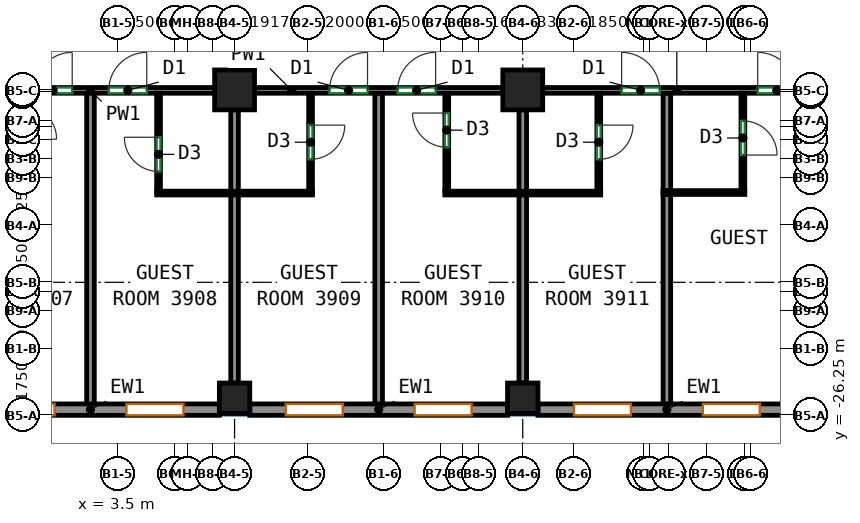
"""IFC4 building model, lengths in metres.
Left out: names, types, materials, properties, quantities, classifications, styles, units other than length and angle.
Written with IfcOpenShell. Run it as: python <this file> out.ifc"""

import sys

from ifc_helpers import new_model, si_unit, direction, frame, frame_2d, origin, origin_2d, place, context, subcontext, project, spatial, rectangle, extrude, source, transform, mapped, element, fill, save


model = new_model("IFC4")
c1 = context("Model", 3, precision=1e-05, world=origin(), true_north=direction((0.0, 1.0)))
c2 = subcontext(c1, "Body", "Model", "MODEL_VIEW")
j1 = project(units=[si_unit("LENGTHUNIT", "METRE"), si_unit("PLANEANGLEUNIT", "RADIAN")], contexts=[c1])
p1 = place(None, origin())
s1 = spatial("IfcSite", under=j1, at=p1, CompositionType="ELEMENT")
p2 = place(p1, origin())
s2 = spatial("IfcBuilding", under=s1, at=p2, CompositionType="ELEMENT")
p3 = place(p2, frame((0.0, 0.0, 168.5)))
s3 = spatial("IfcBuildingStorey", under=s2, at=p3, CompositionType="ELEMENT", Elevation=168.5)
m1 = source(origin(), c2, "Body", "SweptSolid", [
    extrude(rectangle(XDim=0.8, YDim=0.8, at=origin_2d()), origin(), (0.0, 0.0, 1.0), 3.12),
])
p4 = place(p3, frame((6.583, -25.8, 0.0), z_axis=(0.0, 0.0, 1.0), x_axis=(1.0, 0.0, 0.0)))
e1 = element("IfcColumn", 1, at=p4, inside=s3, PredefinedType="COLUMN", context=c2, shape_type="MappedRepresentation", body=[
    mapped(m1, transform((0.0, 0.0, 0.0))),
])
m2 = source(origin(), c2, "Body", "SweptSolid", [
    extrude(rectangle(XDim=1.05, YDim=1.05, at=origin_2d()), origin(), (0.0, 0.0, 1.0), 3.12),
])
p5 = place(p3, frame((6.583, -17.688, 0.0), z_axis=(0.0, 0.0, 1.0), x_axis=(1.0, 0.0, 0.0)))
e2 = element("IfcColumn", 2, at=p5, inside=s3, PredefinedType="COLUMN", context=c2, shape_type="MappedRepresentation", body=[
    mapped(m2, transform((0.0, 0.0, 0.0))),
])
p6 = place(p3, frame((14.167, -25.8, 0.0), z_axis=(0.0, 0.0, 1.0), x_axis=(1.0, 0.0, 0.0)))
e3 = element("IfcColumn", 3, at=p6, inside=s3, PredefinedType="COLUMN", context=c2, shape_type="MappedRepresentation", body=[
    mapped(m1, transform((0.0, 0.0, 0.0))),
])
p7 = place(p3, frame((14.167, -17.688, 0.0), z_axis=(0.0, 0.0, 1.0), x_axis=(1.0, 0.0, 0.0)))
e4 = element("IfcColumn", 4, at=p7, inside=s3, PredefinedType="COLUMN", context=c2, shape_type="MappedRepresentation", body=[
    mapped(m2, transform((0.0, 0.0, 0.0))),
])
m3 = source(origin(), c2, "Body", "SweptSolid", [
    extrude(rectangle(XDim=6.783, YDim=0.3, at=frame_2d((3.392, 0.0))), origin(), (0.0, 0.0, 1.0), 3.12),
])
p8 = place(p3, frame((-0.6, -26.1, 0.0), z_axis=(0.0, 0.0, 1.0), x_axis=(1.0, 0.0, 0.0)))
e5 = element("IfcWall", 5, at=p8, inside=s3, PredefinedType="SOLIDWALL", context=c2, shape_type="MappedRepresentation", body=[
    mapped(m3, transform((0.0, 0.0, 0.0))),
])
p9 = place(p8, frame((0.946, 0.0, 0.85)))
e6 = element("IfcOpeningElement", 6, at=p9, cuts=e5, PredefinedType="OPENING", context=c2, shape_type="SweptSolid", body=[
    extrude(rectangle(XDim=1.5, YDim=1.95, at=frame_2d((0.75, 0.975))), frame((0.0, 0.16, 0.0), z_axis=(0.0, -1.0, 0.0), x_axis=(1.0, 0.0, 0.0)), (0.0, 0.0, 1.0), 0.32),
])
p10 = place(p8, frame((4.337, 0.0, 0.85)))
e7 = element("IfcOpeningElement", 7, at=p10, cuts=e5, PredefinedType="OPENING", context=c2, shape_type="SweptSolid", body=[
    extrude(rectangle(XDim=1.5, YDim=1.95, at=frame_2d((0.75, 0.975))), frame((0.0, 0.16, 0.0), z_axis=(0.0, -1.0, 0.0), x_axis=(1.0, 0.0, 0.0)), (0.0, 0.0, 1.0), 0.32),
])
m4 = source(origin(), c2, "Body", "SweptSolid", [
    extrude(rectangle(XDim=6.783, YDim=0.3, at=frame_2d((3.392, 0.0))), origin(), (0.0, 0.0, 1.0), 3.12),
])
p11 = place(p3, frame((6.983, -26.1, 0.0), z_axis=(0.0, 0.0, 1.0), x_axis=(1.0, 0.0, 0.0)))
e8 = element("IfcWall", 8, at=p11, inside=s3, PredefinedType="SOLIDWALL", context=c2, shape_type="MappedRepresentation", body=[
    mapped(m4, transform((0.0, 0.0, 0.0))),
])
p12 = place(p11, frame((0.946, 0.0, 0.85)))
e9 = element("IfcOpeningElement", 9, at=p12, cuts=e8, PredefinedType="OPENING", context=c2, shape_type="SweptSolid", body=[
    extrude(rectangle(XDim=1.5, YDim=1.95, at=frame_2d((0.75, 0.975))), frame((0.0, 0.16, 0.0), z_axis=(0.0, -1.0, 0.0), x_axis=(1.0, 0.0, 0.0)), (0.0, 0.0, 1.0), 0.32),
])
p13 = place(p11, frame((4.338, 0.0, 0.85)))
e10 = element("IfcOpeningElement", 10, at=p13, cuts=e8, PredefinedType="OPENING", context=c2, shape_type="SweptSolid", body=[
    extrude(rectangle(XDim=1.5, YDim=1.95, at=frame_2d((0.75, 0.975))), frame((0.0, 0.16, 0.0), z_axis=(0.0, -1.0, 0.0), x_axis=(1.0, 0.0, 0.0)), (0.0, 0.0, 1.0), 0.32),
])
p14 = place(p3, frame((14.567, -26.1, 0.0), z_axis=(0.0, 0.0, 1.0), x_axis=(1.0, 0.0, 0.0)))
e11 = element("IfcWall", 11, at=p14, inside=s3, PredefinedType="SOLIDWALL", context=c2, shape_type="MappedRepresentation", body=[
    mapped(m3, transform((0.0, 0.0, 0.0))),
])
p15 = place(p14, frame((0.946, 0.0, 0.85)))
e12 = element("IfcOpeningElement", 12, at=p15, cuts=e11, PredefinedType="OPENING", context=c2, shape_type="SweptSolid", body=[
    extrude(rectangle(XDim=1.5, YDim=1.95, at=frame_2d((0.75, 0.975))), frame((0.0, 0.16, 0.0), z_axis=(0.0, -1.0, 0.0), x_axis=(1.0, 0.0, 0.0)), (0.0, 0.0, 1.0), 0.32),
])
p16 = place(p14, frame((4.337, 0.0, 0.85)))
e13 = element("IfcOpeningElement", 13, at=p16, cuts=e11, PredefinedType="OPENING", context=c2, shape_type="SweptSolid", body=[
    extrude(rectangle(XDim=1.5, YDim=1.95, at=frame_2d((0.75, 0.975))), frame((0.0, 0.16, 0.0), z_axis=(0.0, -1.0, 0.0), x_axis=(1.0, 0.0, 0.0)), (0.0, 0.0, 1.0), 0.32),
])
p17 = place(p3, frame((-0.475, -17.7, 0.0), z_axis=(0.0, 0.0, 1.0), x_axis=(1.0, 0.0, 0.0)))
e14 = element("IfcWall", 14, at=p17, inside=s3, PredefinedType="PARTITIONING", context=c2, shape_type="SweptSolid", body=[
    extrude(rectangle(XDim=6.533, YDim=0.15, at=frame_2d((3.267, 0.0))), origin(), (0.0, 0.0, 1.0), 3.12),
])
p18 = place(p17, frame((1.786, 0.0, 0.0)))
e15 = element("IfcOpeningElement", 15, at=p18, cuts=e14, PredefinedType="OPENING", context=c2, shape_type="SweptSolid", body=[
    extrude(rectangle(XDim=1.0, YDim=2.1, at=frame_2d((0.5, 1.05))), frame((0.0, 0.085, 0.0), z_axis=(0.0, -1.0, 0.0), x_axis=(1.0, 0.0, 0.0)), (0.0, 0.0, 1.0), 0.17),
])
p19 = place(p17, frame((3.748, 0.0, 0.0)))
e16 = element("IfcOpeningElement", 16, at=p19, cuts=e14, PredefinedType="OPENING", context=c2, shape_type="SweptSolid", body=[
    extrude(rectangle(XDim=1.0, YDim=2.1, at=frame_2d((0.5, 1.05))), frame((0.0, 0.085, 0.0), z_axis=(0.0, -1.0, 0.0), x_axis=(1.0, 0.0, 0.0)), (0.0, 0.0, 1.0), 0.17),
])
p20 = place(p3, frame((7.108, -17.7, 0.0), z_axis=(0.0, 0.0, 1.0), x_axis=(1.0, 0.0, 0.0)))
e17 = element("IfcWall", 17, at=p20, inside=s3, PredefinedType="PARTITIONING", context=c2, shape_type="SweptSolid", body=[
    extrude(rectangle(XDim=6.534, YDim=0.15, at=frame_2d((3.267, 0.0))), origin(), (0.0, 0.0, 1.0), 3.12),
])
p21 = place(p20, frame((1.974, 0.0, 0.0)))
e18 = element("IfcOpeningElement", 18, at=p21, cuts=e17, PredefinedType="OPENING", context=c2, shape_type="SweptSolid", body=[
    extrude(rectangle(XDim=1.0, YDim=2.1, at=frame_2d((0.5, 1.05))), frame((0.0, 0.085, 0.0), z_axis=(0.0, -1.0, 0.0), x_axis=(1.0, 0.0, 0.0)), (0.0, 0.0, 1.0), 0.17),
])
p22 = place(p20, frame((3.766, 0.0, 0.0)))
e19 = element("IfcOpeningElement", 19, at=p22, cuts=e17, PredefinedType="OPENING", context=c2, shape_type="SweptSolid", body=[
    extrude(rectangle(XDim=1.0, YDim=2.1, at=frame_2d((0.5, 1.05))), frame((0.0, 0.085, 0.0), z_axis=(0.0, -1.0, 0.0), x_axis=(1.0, 0.0, 0.0)), (0.0, 0.0, 1.0), 0.17),
])
p23 = place(p3, frame((14.692, -17.7, 0.0), z_axis=(0.0, 0.0, 1.0), x_axis=(1.0, 0.0, 0.0)))
e20 = element("IfcWall", 20, at=p23, inside=s3, PredefinedType="PARTITIONING", context=c2, shape_type="SweptSolid", body=[
    extrude(rectangle(XDim=7.058, YDim=0.15, at=frame_2d((3.529, 0.0))), origin(), (0.0, 0.0, 1.0), 2.52),
])
p24 = place(p23, frame((2.077, 0.0, 0.0)))
e21 = element("IfcOpeningElement", 21, at=p24, cuts=e20, PredefinedType="OPENING", context=c2, shape_type="SweptSolid", body=[
    extrude(rectangle(XDim=1.0, YDim=2.1, at=frame_2d((0.5, 1.05))), frame((0.0, 0.085, 0.0), z_axis=(0.0, -1.0, 0.0), x_axis=(1.0, 0.0, 0.0)), (0.0, 0.0, 1.0), 0.17),
])
p25 = place(p23, frame((5.657, 0.0, 0.0)))
e22 = element("IfcOpeningElement", 22, at=p25, cuts=e20, PredefinedType="OPENING", context=c2, shape_type="SweptSolid", body=[
    extrude(rectangle(XDim=1.0, YDim=2.1, at=frame_2d((0.5, 1.05))), frame((0.0, 0.085, 0.0), z_axis=(0.0, -1.0, 0.0), x_axis=(1.0, 0.0, 0.0)), (0.0, 0.0, 1.0), 0.17),
])
p26 = place(p3, frame((2.792, -26.0, 0.0), z_axis=(0.0, 0.0, 1.0), x_axis=(0.0, 1.0, 0.0)))
e23 = element("IfcWall", 23, at=p26, inside=s3, PredefinedType="PARTITIONING", context=c2, shape_type="SweptSolid", body=[
    extrude(rectangle(XDim=8.223, YDim=0.2, at=frame_2d((4.111, 0.0))), origin(), (0.0, 0.0, 1.0), 3.12),
])
p27 = place(p3, frame((4.583, -20.352, 0.0), z_axis=(0.0, 0.0, 1.0), x_axis=(0.0, 1.0, 0.0)))
e24 = element("IfcWall", 24, at=p27, inside=s3, PredefinedType="PARTITIONING", context=c2, shape_type="SweptSolid", body=[
    extrude(rectangle(XDim=2.575, YDim=0.1, at=frame_2d((1.288, 0.0))), origin(), (0.0, 0.0, 1.0), 3.12),
])
p28 = place(p27, frame((0.519, 0.0, 0.0)))
e25 = element("IfcOpeningElement", 25, at=p28, cuts=e24, PredefinedType="OPENING", context=c2, shape_type="SweptSolid", body=[
    extrude(rectangle(XDim=0.9, YDim=2.1, at=frame_2d((0.45, 1.05))), frame((0.0, 0.06, 0.0), z_axis=(0.0, -1.0, 0.0), x_axis=(1.0, 0.0, 0.0)), (0.0, 0.0, 1.0), 0.12),
])
p29 = place(p3, frame((4.533, -20.402, 0.0), z_axis=(0.0, 0.0, 1.0), x_axis=(1.0, 0.0, 0.0)))
e26 = element("IfcWall", 26, at=p29, inside=s3, PredefinedType="PARTITIONING", context=c2, shape_type="SweptSolid", body=[
    extrude(rectangle(XDim=4.1, YDim=0.1, at=frame_2d((2.05, 0.0))), origin(), (0.0, 0.0, 1.0), 3.12),
])
p30 = place(p3, frame((6.583, -25.4, 0.0), z_axis=(0.0, 0.0, 1.0), x_axis=(0.0, 1.0, 0.0)))
e27 = element("IfcWall", 27, at=p30, inside=s3, PredefinedType="PARTITIONING", context=c2, shape_type="SweptSolid", body=[
    extrude(rectangle(XDim=4.948, YDim=0.2, at=frame_2d((2.474, 0.0))), origin(), (0.0, 0.0, 1.0), 3.12),
])
p31 = place(p3, frame((6.583, -20.352, 0.0), z_axis=(0.0, 0.0, 1.0), x_axis=(0.0, 1.0, 0.0)))
e28 = element("IfcWall", 28, at=p31, inside=s3, PredefinedType="PARTITIONING", context=c2, shape_type="SweptSolid", body=[
    extrude(rectangle(XDim=2.14, YDim=0.2, at=frame_2d((1.07, 0.0))), origin(), (0.0, 0.0, 1.0), 3.12),
])
p32 = place(p3, frame((8.583, -17.777, 0.0), z_axis=(0.0, 0.0, 1.0), x_axis=(0.0, -1.0, 0.0)))
e29 = element("IfcWall", 29, at=p32, inside=s3, PredefinedType="PARTITIONING", context=c2, shape_type="SweptSolid", body=[
    extrude(rectangle(XDim=2.575, YDim=0.1, at=frame_2d((1.288, 0.0))), origin(), (0.0, 0.0, 1.0), 3.12),
])
p33 = place(p32, frame((0.837, 0.0, 0.0)))
e30 = element("IfcOpeningElement", 30, at=p33, cuts=e29, PredefinedType="OPENING", context=c2, shape_type="SweptSolid", body=[
    extrude(rectangle(XDim=0.9, YDim=2.1, at=frame_2d((0.45, 1.05))), frame((0.0, 0.06, 0.0), z_axis=(0.0, -1.0, 0.0), x_axis=(1.0, 0.0, 0.0)), (0.0, 0.0, 1.0), 0.12),
])
p34 = place(p3, frame((10.375, -26.0, 0.0), z_axis=(0.0, 0.0, 1.0), x_axis=(0.0, 1.0, 0.0)))
e31 = element("IfcWall", 31, at=p34, inside=s3, PredefinedType="PARTITIONING", context=c2, shape_type="SweptSolid", body=[
    extrude(rectangle(XDim=8.223, YDim=0.2, at=frame_2d((4.111, 0.0))), origin(), (0.0, 0.0, 1.0), 3.12),
])
p35 = place(p3, frame((12.167, -20.352, 0.0), z_axis=(0.0, 0.0, 1.0), x_axis=(0.0, 1.0, 0.0)))
e32 = element("IfcWall", 32, at=p35, inside=s3, PredefinedType="PARTITIONING", context=c2, shape_type="SweptSolid", body=[
    extrude(rectangle(XDim=2.575, YDim=0.1, at=frame_2d((1.288, 0.0))), origin(), (0.0, 0.0, 1.0), 3.12),
])
p36 = place(p35, frame((1.156, 0.0, 0.0)))
e33 = element("IfcOpeningElement", 33, at=p36, cuts=e32, PredefinedType="OPENING", context=c2, shape_type="SweptSolid", body=[
    extrude(rectangle(XDim=0.9, YDim=2.1, at=frame_2d((0.45, 1.05))), frame((0.0, 0.06, 0.0), z_axis=(0.0, -1.0, 0.0), x_axis=(1.0, 0.0, 0.0)), (0.0, 0.0, 1.0), 0.12),
])
p37 = place(p3, frame((12.117, -20.402, 0.0), z_axis=(0.0, 0.0, 1.0), x_axis=(1.0, 0.0, 0.0)))
e34 = element("IfcWall", 34, at=p37, inside=s3, PredefinedType="PARTITIONING", context=c2, shape_type="SweptSolid", body=[
    extrude(rectangle(XDim=4.1, YDim=0.1, at=frame_2d((2.05, 0.0))), origin(), (0.0, 0.0, 1.0), 3.12),
])
p38 = place(p3, frame((14.167, -25.4, 0.0), z_axis=(0.0, 0.0, 1.0), x_axis=(0.0, 1.0, 0.0)))
e35 = element("IfcWall", 35, at=p38, inside=s3, PredefinedType="PARTITIONING", context=c2, shape_type="SweptSolid", body=[
    extrude(rectangle(XDim=4.948, YDim=0.2, at=frame_2d((2.474, 0.0))), origin(), (0.0, 0.0, 1.0), 3.12),
])
p39 = place(p3, frame((14.167, -20.352, 0.0), z_axis=(0.0, 0.0, 1.0), x_axis=(0.0, 1.0, 0.0)))
e36 = element("IfcWall", 36, at=p39, inside=s3, PredefinedType="PARTITIONING", context=c2, shape_type="SweptSolid", body=[
    extrude(rectangle(XDim=2.14, YDim=0.2, at=frame_2d((1.07, 0.0))), origin(), (0.0, 0.0, 1.0), 3.12),
])
p40 = place(p3, frame((16.167, -17.777, 0.0), z_axis=(0.0, 0.0, 1.0), x_axis=(0.0, -1.0, 0.0)))
e37 = element("IfcWall", 37, at=p40, inside=s3, PredefinedType="PARTITIONING", context=c2, shape_type="SweptSolid", body=[
    extrude(rectangle(XDim=2.575, YDim=0.1, at=frame_2d((1.288, 0.0))), origin(), (0.0, 0.0, 1.0), 3.12),
])
p41 = place(p40, frame((0.837, 0.0, 0.0)))
e38 = element("IfcOpeningElement", 38, at=p41, cuts=e37, PredefinedType="OPENING", context=c2, shape_type="SweptSolid", body=[
    extrude(rectangle(XDim=0.9, YDim=2.1, at=frame_2d((0.45, 1.05))), frame((0.0, 0.06, 0.0), z_axis=(0.0, -1.0, 0.0), x_axis=(1.0, 0.0, 0.0)), (0.0, 0.0, 1.0), 0.12),
])
p42 = place(p3, frame((17.959, -26.0, 0.0), z_axis=(0.0, 0.0, 1.0), x_axis=(0.0, 1.0, 0.0)))
e39 = element("IfcWall", 39, at=p42, inside=s3, PredefinedType="PARTITIONING", context=c2, shape_type="SweptSolid", body=[
    extrude(rectangle(XDim=5.572, YDim=0.2, at=frame_2d((2.786, 0.0))), origin(), (0.0, 0.0, 1.0), 3.12),
])
p43 = place(p3, frame((17.959, -20.348, 0.0), z_axis=(0.0, 0.0, 1.0), x_axis=(0.0, 1.0, 0.0)))
e40 = element("IfcWall", 40, at=p43, inside=s3, PredefinedType="PARTITIONING", context=c2, shape_type="SweptSolid", body=[
    extrude(rectangle(XDim=2.571, YDim=0.2, at=frame_2d((1.285, 0.0))), origin(), (0.0, 0.0, 1.0), 3.12),
])
p44 = place(p3, frame((17.859, -20.388, 0.0), z_axis=(0.0, 0.0, 1.0), x_axis=(1.0, 0.0, 0.0)))
e41 = element("IfcWall", 41, at=p44, inside=s3, PredefinedType="PARTITIONING", context=c2, shape_type="SweptSolid", body=[
    extrude(rectangle(XDim=2.15, YDim=0.1, at=frame_2d((1.075, 0.0))), origin(), (0.0, 0.0, 1.0), 3.12),
])
p45 = place(p3, frame((19.959, -17.777, 0.0), z_axis=(0.0, 0.0, 1.0), x_axis=(0.0, -1.0, 0.0)))
e42 = element("IfcWall", 42, at=p45, inside=s3, PredefinedType="PARTITIONING", context=c2, shape_type="SweptSolid", body=[
    extrude(rectangle(XDim=2.561, YDim=0.1, at=frame_2d((1.28, 0.0))), origin(), (0.0, 0.0, 1.0), 3.12),
])
p46 = place(p45, frame((0.725, 0.0, 0.0)))
e43 = element("IfcOpeningElement", 43, at=p46, cuts=e42, PredefinedType="OPENING", context=c2, shape_type="SweptSolid", body=[
    extrude(rectangle(XDim=0.9, YDim=2.1, at=frame_2d((0.45, 1.05))), frame((0.0, 0.06, 0.0), z_axis=(0.0, -1.0, 0.0), x_axis=(1.0, 0.0, 0.0)), (0.0, 0.0, 1.0), 0.12),
])
p47 = place(p9, origin())
e44 = element("IfcWindow", 44, at=p47, inside=s3, PartitioningType="SINGLE_PANEL", PredefinedType="WINDOW", context=c2, shape_type="SweptSolid", body=[
    extrude(rectangle(XDim=1.5, YDim=1.95, at=frame_2d((0.75, 0.975))), frame((0.0, 0.03, 0.0), z_axis=(0.0, -1.0, 0.0), x_axis=(1.0, 0.0, 0.0)), (0.0, 0.0, 1.0), 0.06),
])
fill(e6, e44)
p48 = place(p10, origin())
e45 = element("IfcWindow", 45, at=p48, inside=s3, PartitioningType="SINGLE_PANEL", PredefinedType="WINDOW", context=c2, shape_type="SweptSolid", body=[
    extrude(rectangle(XDim=1.5, YDim=1.95, at=frame_2d((0.75, 0.975))), frame((0.0, 0.03, 0.0), z_axis=(0.0, -1.0, 0.0), x_axis=(1.0, 0.0, 0.0)), (0.0, 0.0, 1.0), 0.06),
])
fill(e7, e45)
p49 = place(p12, origin())
e46 = element("IfcWindow", 46, at=p49, inside=s3, PartitioningType="SINGLE_PANEL", PredefinedType="WINDOW", context=c2, shape_type="SweptSolid", body=[
    extrude(rectangle(XDim=1.5, YDim=1.95, at=frame_2d((0.75, 0.975))), frame((0.0, 0.03, 0.0), z_axis=(0.0, -1.0, 0.0), x_axis=(1.0, 0.0, 0.0)), (0.0, 0.0, 1.0), 0.06),
])
fill(e9, e46)
p50 = place(p13, origin())
e47 = element("IfcWindow", 47, at=p50, inside=s3, PartitioningType="SINGLE_PANEL", PredefinedType="WINDOW", context=c2, shape_type="SweptSolid", body=[
    extrude(rectangle(XDim=1.5, YDim=1.95, at=frame_2d((0.75, 0.975))), frame((0.0, 0.03, 0.0), z_axis=(0.0, -1.0, 0.0), x_axis=(1.0, 0.0, 0.0)), (0.0, 0.0, 1.0), 0.06),
])
fill(e10, e47)
p51 = place(p15, origin())
e48 = element("IfcWindow", 48, at=p51, inside=s3, PartitioningType="SINGLE_PANEL", PredefinedType="WINDOW", context=c2, shape_type="SweptSolid", body=[
    extrude(rectangle(XDim=1.5, YDim=1.95, at=frame_2d((0.75, 0.975))), frame((0.0, 0.03, 0.0), z_axis=(0.0, -1.0, 0.0), x_axis=(1.0, 0.0, 0.0)), (0.0, 0.0, 1.0), 0.06),
])
fill(e12, e48)
p52 = place(p16, origin())
e49 = element("IfcWindow", 49, at=p52, inside=s3, PartitioningType="SINGLE_PANEL", PredefinedType="WINDOW", context=c2, shape_type="SweptSolid", body=[
    extrude(rectangle(XDim=1.5, YDim=1.95, at=frame_2d((0.75, 0.975))), frame((0.0, 0.03, 0.0), z_axis=(0.0, -1.0, 0.0), x_axis=(1.0, 0.0, 0.0)), (0.0, 0.0, 1.0), 0.06),
])
fill(e13, e49)
p53 = place(p28, origin())
e50 = element("IfcDoor", 50, at=p53, inside=s3, OperationType="SINGLE_SWING_RIGHT", PredefinedType="DOOR", context=c2, shape_type="SweptSolid", body=[
    extrude(rectangle(XDim=0.9, YDim=2.1, at=frame_2d((0.45, 1.05))), frame((0.0, 0.025, 0.0), z_axis=(0.0, -1.0, 0.0), x_axis=(1.0, 0.0, 0.0)), (0.0, 0.0, 1.0), 0.05),
])
fill(e25, e50)
p54 = place(p33, origin())
e51 = element("IfcDoor", 51, at=p54, inside=s3, OperationType="SINGLE_SWING_LEFT", PredefinedType="DOOR", context=c2, shape_type="SweptSolid", body=[
    extrude(rectangle(XDim=0.9, YDim=2.1, at=frame_2d((0.45, 1.05))), frame((0.0, 0.025, 0.0), z_axis=(0.0, -1.0, 0.0), x_axis=(1.0, 0.0, 0.0)), (0.0, 0.0, 1.0), 0.05),
])
fill(e30, e51)
p55 = place(p41, origin())
e52 = element("IfcDoor", 52, at=p55, inside=s3, OperationType="SINGLE_SWING_LEFT", PredefinedType="DOOR", context=c2, shape_type="SweptSolid", body=[
    extrude(rectangle(XDim=0.9, YDim=2.1, at=frame_2d((0.45, 1.05))), frame((0.0, 0.025, 0.0), z_axis=(0.0, -1.0, 0.0), x_axis=(1.0, 0.0, 0.0)), (0.0, 0.0, 1.0), 0.05),
])
fill(e38, e52)
p56 = place(p46, origin())
e53 = element("IfcDoor", 53, at=p56, inside=s3, OperationType="SINGLE_SWING_RIGHT", PredefinedType="DOOR", context=c2, shape_type="SweptSolid", body=[
    extrude(rectangle(XDim=0.9, YDim=2.1, at=frame_2d((0.45, 1.05))), frame((0.0, 0.025, 0.0), z_axis=(0.0, -1.0, 0.0), x_axis=(1.0, 0.0, 0.0)), (0.0, 0.0, 1.0), 0.05),
])
fill(e43, e53)
p57 = place(p36, origin())
e54 = element("IfcDoor", 54, at=p57, inside=s3, OperationType="SINGLE_SWING_RIGHT", PredefinedType="DOOR", context=c2, shape_type="SweptSolid", body=[
    extrude(rectangle(XDim=0.9, YDim=2.1, at=frame_2d((0.45, 1.05))), frame((0.0, 0.025, 0.0), z_axis=(0.0, -1.0, 0.0), x_axis=(1.0, 0.0, 0.0)), (0.0, 0.0, 1.0), 0.05),
])
fill(e33, e54)
p58 = place(p18, origin())
e55 = element("IfcDoor", 55, at=p58, inside=s3, OperationType="SINGLE_SWING_RIGHT", PredefinedType="DOOR", context=c2, shape_type="SweptSolid", body=[
    extrude(rectangle(XDim=1.0, YDim=2.1, at=frame_2d((0.5, 1.05))), frame((0.0, 0.025, 0.0), z_axis=(0.0, -1.0, 0.0), x_axis=(1.0, 0.0, 0.0)), (0.0, 0.0, 1.0), 0.05),
])
fill(e15, e55)
p59 = place(p19, origin())
e56 = element("IfcDoor", 56, at=p59, inside=s3, OperationType="SINGLE_SWING_RIGHT", PredefinedType="DOOR", context=c2, shape_type="SweptSolid", body=[
    extrude(rectangle(XDim=1.0, YDim=2.1, at=frame_2d((0.5, 1.05))), frame((0.0, 0.025, 0.0), z_axis=(0.0, -1.0, 0.0), x_axis=(1.0, 0.0, 0.0)), (0.0, 0.0, 1.0), 0.05),
])
fill(e16, e56)
p60 = place(p21, origin())
e57 = element("IfcDoor", 57, at=p60, inside=s3, OperationType="SINGLE_SWING_RIGHT", PredefinedType="DOOR", context=c2, shape_type="SweptSolid", body=[
    extrude(rectangle(XDim=1.0, YDim=2.1, at=frame_2d((0.5, 1.05))), frame((0.0, 0.025, 0.0), z_axis=(0.0, -1.0, 0.0), x_axis=(1.0, 0.0, 0.0)), (0.0, 0.0, 1.0), 0.05),
])
fill(e18, e57)
p61 = place(p22, origin())
e58 = element("IfcDoor", 58, at=p61, inside=s3, OperationType="SINGLE_SWING_RIGHT", PredefinedType="DOOR", context=c2, shape_type="SweptSolid", body=[
    extrude(rectangle(XDim=1.0, YDim=2.1, at=frame_2d((0.5, 1.05))), frame((0.0, 0.025, 0.0), z_axis=(0.0, -1.0, 0.0), x_axis=(1.0, 0.0, 0.0)), (0.0, 0.0, 1.0), 0.05),
])
fill(e19, e58)
p62 = place(p24, origin())
e59 = element("IfcDoor", 59, at=p62, inside=s3, OperationType="SINGLE_SWING_LEFT", PredefinedType="DOOR", context=c2, shape_type="SweptSolid", body=[
    extrude(rectangle(XDim=1.0, YDim=2.1, at=frame_2d((0.5, 1.05))), frame((0.0, 0.025, 0.0), z_axis=(0.0, -1.0, 0.0), x_axis=(1.0, 0.0, 0.0)), (0.0, 0.0, 1.0), 0.05),
])
fill(e21, e59)
p63 = place(p25, origin())
e60 = element("IfcDoor", 60, at=p63, inside=s3, OperationType="SINGLE_SWING_LEFT", PredefinedType="DOOR", context=c2, shape_type="SweptSolid", body=[
    extrude(rectangle(XDim=1.0, YDim=2.1, at=frame_2d((0.5, 1.05))), frame((0.0, 0.025, 0.0), z_axis=(0.0, -1.0, 0.0), x_axis=(1.0, 0.0, 0.0)), (0.0, 0.0, 1.0), 0.05),
])
fill(e22, e60)
save(model, sys.argv[1])
